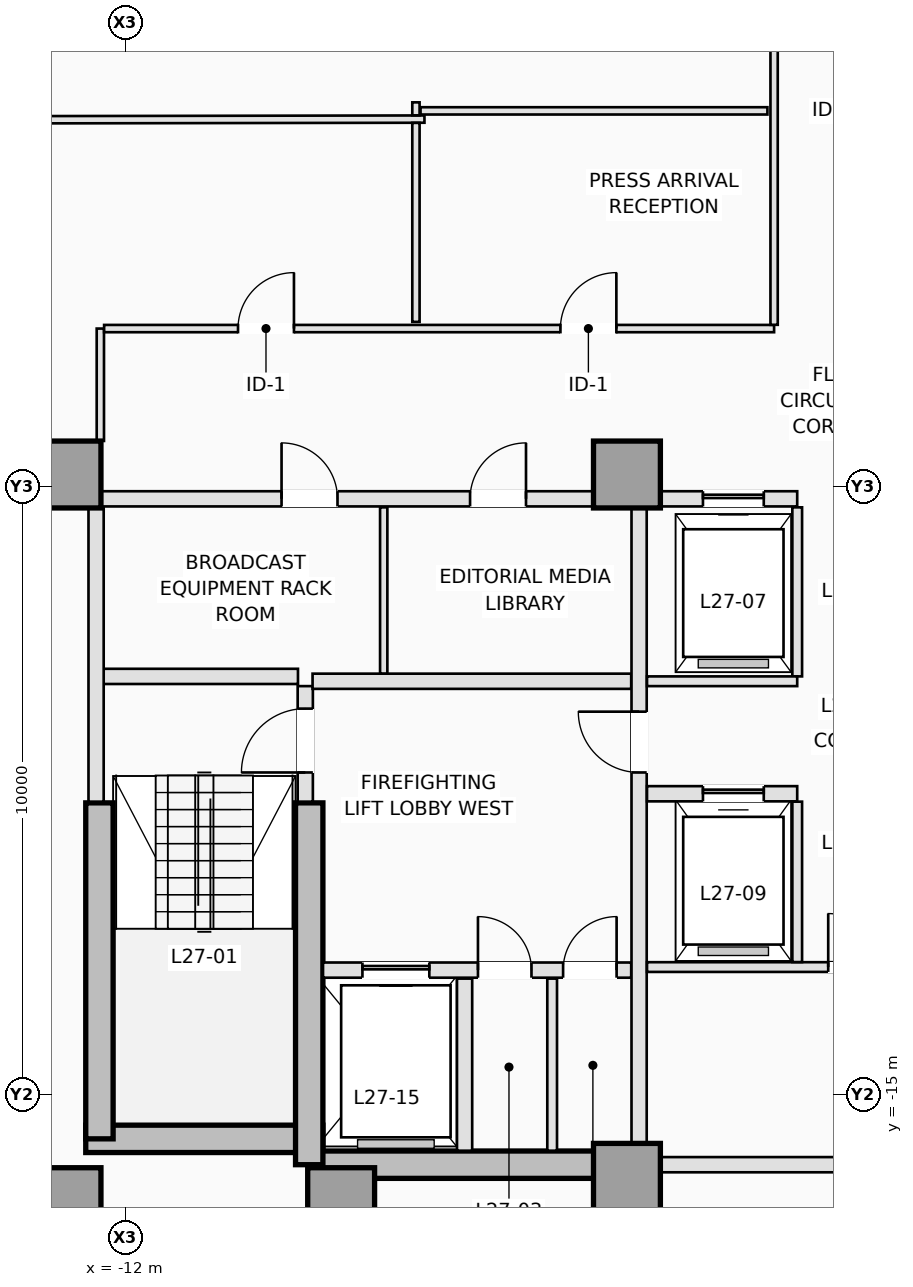
"""IFC4 building model, lengths in metres.
Left out: names, types, materials, properties, quantities, classifications, styles, units other than length and angle.
Written with IfcOpenShell. Run it as: python <this file> out.ifc"""

import sys

from ifc_helpers import new_model, si_unit, direction, frame, frame_2d, origin, origin_2d, place, context, subcontext, project, spatial, rectangle, extrude, element, fill, save


model = new_model("IFC4")
c1 = context("Model", 3, precision=1e-05, world=origin(), true_north=direction((0.0, 1.0)))
c2 = subcontext(c1, "Body", "Model", "MODEL_VIEW")
j1 = project(units=[si_unit("LENGTHUNIT", "METRE"), si_unit("PLANEANGLEUNIT", "RADIAN")], contexts=[c1])
p1 = place(None, origin())
s1 = spatial("IfcSite", under=j1, at=p1, CompositionType="ELEMENT")
p2 = place(p1, origin())
s2 = spatial("IfcBuilding", under=s1, at=p2, CompositionType="ELEMENT")
p3 = place(p2, frame((0.0, 0.0, 102.0)))
s3 = spatial("IfcBuildingStorey", under=s2, at=p3, CompositionType="ELEMENT", Elevation=102.0)
p4 = place(p3, frame((-12.65, -15.725, 0.0), z_axis=(0.0, 0.0, 1.0), x_axis=(1.0, 0.0, 0.0)))
e1 = element("IfcWall", 1, at=p4, inside=s3, PredefinedType="SHEAR", context=c2, shape_type="SweptSolid", body=[
    extrude(rectangle(XDim=3.9, YDim=0.45, at=frame_2d((1.95, 0.0))), origin(), (0.0, 0.0, 1.0), 3.5),
])
p5 = place(p3, frame((-8.975, -16.15, 0.0), z_axis=(0.0, 0.0, 1.0), x_axis=(1.0, 0.0, 0.0)))
e2 = element("IfcWall", 2, at=p5, inside=s3, PredefinedType="SHEAR", context=c2, shape_type="SweptSolid", body=[
    extrude(rectangle(XDim=5.225, YDim=0.45, at=frame_2d((2.613, 0.0))), origin(), (0.0, 0.0, 1.0), 3.5),
])
p6 = place(p3, frame((-12.425, -15.725, 0.0), z_axis=(0.0, 0.0, 1.0), x_axis=(0.0, 1.0, 0.0)))
e3 = element("IfcWall", 3, at=p6, inside=s3, PredefinedType="SHEAR", context=c2, shape_type="SweptSolid", body=[
    extrude(rectangle(XDim=5.525, YDim=0.45, at=frame_2d((2.763, 0.0))), origin(), (0.0, 0.0, 1.0), 3.5),
])
p7 = place(p3, frame((-8.975, -16.15, 0.0), z_axis=(0.0, 0.0, 1.0), x_axis=(0.0, 1.0, 0.0)))
e4 = element("IfcWall", 4, at=p7, inside=s3, PredefinedType="SHEAR", context=c2, shape_type="SweptSolid", body=[
    extrude(rectangle(XDim=5.95, YDim=0.45, at=frame_2d((2.975, 0.0))), origin(), (0.0, 0.0, 1.0), 3.5),
])
for number, where, z_axis, x_axis in (
    (5, (-12.95, -16.75, 0.0), (0.0, 0.0, 1.0), (1.0, 0.0, 0.0)),
    (6, (-8.45, -16.75, 0.0), (0.0, 0.0, 1.0), (1.0, 0.0, 0.0)),
    (7, (-3.75, -16.35, 0.0), (0.0, 0.0, 1.0), (1.0, 0.0, 0.0)),
    (8, (-12.95, -4.8, 0.0), (0.0, 0.0, 1.0), (1.0, 0.0, 0.0)),
    (9, (-3.75, -4.8, 0.0), (0.0, 0.0, 1.0), (1.0, 0.0, 0.0)),
):
    element("IfcColumn", number, at=place(p3, frame(where, z_axis=z_axis, x_axis=x_axis)), inside=s3, PredefinedType="COLUMN", context=c2, shape_type="SweptSolid", body=[
        extrude(rectangle(XDim=1.1, YDim=1.1, at=origin_2d()), origin(), (0.0, 0.0, 1.0), 3.5),
    ])
p8 = place(p3, frame((-9.04, -10.18, 0.0), z_axis=(0.0, 0.0, 1.0), x_axis=(0.0, 1.0, 0.0)))
e10 = element("IfcWall", 10, at=p8, inside=s3, PredefinedType="PARTITIONING", context=c2, shape_type="SweptSolid", body=[
    extrude(rectangle(XDim=1.9, YDim=0.25, at=frame_2d((0.95, 0.0))), origin(), (0.0, 0.0, 1.0), 3.25),
])
p9 = place(p8, frame((0.48, 0.0, 0.0)))
e11 = element("IfcOpeningElement", 11, at=p9, cuts=e10, PredefinedType="OPENING", context=c2, shape_type="SweptSolid", body=[
    extrude(rectangle(XDim=1.05, YDim=2.15, at=frame_2d((0.525, 1.075))), frame((0.0, 0.135, 0.0), z_axis=(0.0, -1.0, 0.0), x_axis=(1.0, 0.0, 0.0)), (0.0, 0.0, 1.0), 0.27),
])
p10 = place(p3, frame((-12.38, -8.12, 0.0), z_axis=(0.0, 0.0, 1.0), x_axis=(1.0, 0.0, 0.0)))
e12 = element("IfcWall", 12, at=p10, inside=s3, PredefinedType="PARTITIONING", context=c2, shape_type="SweptSolid", body=[
    extrude(rectangle(XDim=3.22, YDim=0.25, at=frame_2d((1.61, 0.0))), origin(), (0.0, 0.0, 1.0), 3.25),
])
p11 = place(p3, frame((-12.48, -10.18, 0.0), z_axis=(0.0, 0.0, 1.0), x_axis=(0.0, 1.0, 0.0)))
e13 = element("IfcWall", 13, at=p11, inside=s3, PredefinedType="PARTITIONING", context=c2, shape_type="SweptSolid", body=[
    extrude(rectangle(XDim=4.828, YDim=0.25, at=frame_2d((2.414, 0.0))), origin(), (0.0, 0.0, 1.0), 3.25),
])
p12 = place(p3, frame((-8.748, -12.95, 0.0), z_axis=(0.0, 0.0, 1.0), x_axis=(1.0, 0.0, 0.0)))
e14 = element("IfcWall", 14, at=p12, inside=s3, PredefinedType="PARTITIONING", context=c2, shape_type="SweptSolid", body=[
    extrude(rectangle(XDim=5.068, YDim=0.25, at=frame_2d((2.534, 0.0))), origin(), (0.0, 0.0, 1.0), 3.25),
])
p13 = place(p12, frame((0.648, 0.0, 0.0)))
e15 = element("IfcOpeningElement", 15, at=p13, cuts=e14, PredefinedType="OPENING", context=c2, shape_type="SweptSolid", body=[
    extrude(rectangle(XDim=1.1, YDim=2.15, at=frame_2d((0.55, 1.075))), frame((0.0, 0.135, 0.0), z_axis=(0.0, -1.0, 0.0), x_axis=(1.0, 0.0, 0.0)), (0.0, 0.0, 1.0), 0.27),
])
p14 = place(p12, frame((2.548, 0.0, 0.0)))
e16 = element("IfcOpeningElement", 16, at=p14, cuts=e14, PredefinedType="OPENING", context=c2, shape_type="SweptSolid", body=[
    extrude(rectangle(XDim=0.88, YDim=2.1, at=frame_2d((0.44, 1.05))), frame((0.0, 0.135, 0.0), z_axis=(0.0, -1.0, 0.0), x_axis=(1.0, 0.0, 0.0)), (0.0, 0.0, 1.0), 0.27),
])
p15 = place(p12, frame((3.948, 0.0, 0.0)))
e17 = element("IfcOpeningElement", 17, at=p15, cuts=e14, PredefinedType="OPENING", context=c2, shape_type="SweptSolid", body=[
    extrude(rectangle(XDim=0.88, YDim=2.1, at=frame_2d((0.44, 1.05))), frame((0.0, 0.135, 0.0), z_axis=(0.0, -1.0, 0.0), x_axis=(1.0, 0.0, 0.0)), (0.0, 0.0, 1.0), 0.27),
])
p16 = place(p3, frame((-6.42, -15.92, 0.0), z_axis=(0.0, 0.0, 1.0), x_axis=(0.0, 1.0, 0.0)))
e18 = element("IfcWall", 18, at=p16, inside=s3, PredefinedType="PARTITIONING", context=c2, shape_type="SweptSolid", body=[
    extrude(rectangle(XDim=2.83, YDim=0.25, at=frame_2d((1.415, 0.0))), origin(), (0.0, 0.0, 1.0), 3.25),
])
p17 = place(p3, frame((-4.98, -15.92, 0.0), z_axis=(0.0, 0.0, 1.0), x_axis=(0.0, 1.0, 0.0)))
e19 = element("IfcWall", 19, at=p17, inside=s3, PredefinedType="PARTITIONING", context=c2, shape_type="SweptSolid", body=[
    extrude(rectangle(XDim=2.83, YDim=0.16, at=frame_2d((1.415, 0.0))), origin(), (0.0, 0.0, 1.0), 3.25),
])
p18 = place(p3, frame((-8.92, -8.2, 0.0), z_axis=(0.0, 0.0, 1.0), x_axis=(1.0, 0.0, 0.0)))
e20 = element("IfcWall", 20, at=p18, inside=s3, PredefinedType="PARTITIONING", context=c2, shape_type="SweptSolid", body=[
    extrude(rectangle(XDim=5.24, YDim=0.25, at=frame_2d((2.62, 0.0))), origin(), (0.0, 0.0, 1.0), 3.25),
])
p19 = place(p3, frame((-3.55, -15.798, 0.0), z_axis=(0.0, 0.0, 1.0), x_axis=(0.0, 1.0, 0.0)))
e21 = element("IfcWall", 21, at=p19, inside=s3, PredefinedType="PARTITIONING", context=c2, shape_type="SweptSolid", body=[
    extrude(rectangle(XDim=10.446, YDim=0.25, at=frame_2d((5.223, 0.0))), origin(), (0.0, 0.0, 1.0), 3.25),
])
p20 = place(p19, frame((6.098, 0.0, 0.0)))
e22 = element("IfcOpeningElement", 22, at=p20, cuts=e21, PredefinedType="OPENING", context=c2, shape_type="SweptSolid", body=[
    extrude(rectangle(XDim=1.0, YDim=2.15, at=frame_2d((0.5, 1.075))), frame((0.0, 0.135, 0.0), z_axis=(0.0, -1.0, 0.0), x_axis=(1.0, 0.0, 0.0)), (0.0, 0.0, 1.0), 0.27),
])
p21 = place(p3, frame((-12.398, -5.2, 0.0), z_axis=(0.0, 0.0, 1.0), x_axis=(1.0, 0.0, 0.0)))
e23 = element("IfcWall", 23, at=p21, inside=s3, PredefinedType="PARTITIONING", context=c2, shape_type="SweptSolid", body=[
    extrude(rectangle(XDim=8.096, YDim=0.25, at=frame_2d((4.048, 0.0))), origin(), (0.0, 0.0, 1.0), 3.25),
])
p22 = place(p21, frame((2.968, 0.0, 0.0)))
e24 = element("IfcOpeningElement", 24, at=p22, cuts=e23, PredefinedType="OPENING", context=c2, shape_type="SweptSolid", body=[
    extrude(rectangle(XDim=0.92, YDim=2.12, at=frame_2d((0.46, 1.06))), frame((0.0, 0.135, 0.0), z_axis=(0.0, -1.0, 0.0), x_axis=(1.0, 0.0, 0.0)), (0.0, 0.0, 1.0), 0.27),
])
p23 = place(p21, frame((6.068, 0.0, 0.0)))
e25 = element("IfcOpeningElement", 25, at=p23, cuts=e23, PredefinedType="OPENING", context=c2, shape_type="SweptSolid", body=[
    extrude(rectangle(XDim=0.92, YDim=2.12, at=frame_2d((0.46, 1.06))), frame((0.0, 0.135, 0.0), z_axis=(0.0, -1.0, 0.0), x_axis=(1.0, 0.0, 0.0)), (0.0, 0.0, 1.0), 0.27),
])
p24 = place(p3, frame((-3.198, -5.2, 0.0), z_axis=(0.0, 0.0, 1.0), x_axis=(1.0, 0.0, 0.0)))
e26 = element("IfcWall", 26, at=p24, inside=s3, PredefinedType="PARTITIONING", context=c2, shape_type="SweptSolid", body=[
    extrude(rectangle(XDim=2.248, YDim=0.25, at=frame_2d((1.124, 0.0))), origin(), (0.0, 0.0, 1.0), 3.25),
])
p25 = place(p24, frame((0.698, 0.0, 0.0)))
e27 = element("IfcOpeningElement", 27, at=p25, cuts=e26, PredefinedType="OPENING", context=c2, shape_type="SweptSolid", body=[
    extrude(rectangle(XDim=1.0, YDim=2.15, at=frame_2d((0.5, 1.075))), frame((0.0, 0.135, 0.0), z_axis=(0.0, -1.0, 0.0), x_axis=(1.0, 0.0, 0.0)), (0.0, 0.0, 1.0), 0.27),
])
p26 = place(p3, frame((-7.75, -8.073, 0.0), z_axis=(0.0, 0.0, 1.0), x_axis=(0.0, 1.0, 0.0)))
e28 = element("IfcWall", 28, at=p26, inside=s3, PredefinedType="PARTITIONING", context=c2, shape_type="SweptSolid", body=[
    extrude(rectangle(XDim=2.733, YDim=0.12, at=frame_2d((1.366, 0.0))), origin(), (0.0, 0.0, 1.0), 3.25),
])
p27 = place(p3, frame((-3.198, -16.15, 0.0), z_axis=(0.0, 0.0, 1.0), x_axis=(1.0, 0.0, 0.0)))
e29 = element("IfcWall", 29, at=p27, inside=s3, PredefinedType="PARTITIONING", context=c2, shape_type="SweptSolid", body=[
    extrude(rectangle(XDim=6.396, YDim=0.25, at=frame_2d((3.198, 0.0))), origin(), (0.0, 0.0, 1.0), 2.3),
])
p28 = place(p3, frame((-0.95, -8.12, 0.0), z_axis=(0.0, 0.0, 1.0), x_axis=(0.0, 1.0, 0.0)))
e30 = element("IfcWall", 30, at=p28, inside=s3, PredefinedType="PARTITIONING", context=c2, shape_type="SweptSolid", body=[
    extrude(rectangle(XDim=2.78, YDim=0.16, at=frame_2d((1.39, 0.0))), origin(), (0.0, 0.0, 1.0), 3.25),
])
p29 = place(p3, frame((-3.42, -8.2, 0.0), z_axis=(0.0, 0.0, 1.0), x_axis=(1.0, 0.0, 0.0)))
e31 = element("IfcWall", 31, at=p29, inside=s3, PredefinedType="PARTITIONING", context=c2, shape_type="SweptSolid", body=[
    extrude(rectangle(XDim=2.47, YDim=0.16, at=frame_2d((1.235, 0.0))), origin(), (0.0, 0.0, 1.0), 3.25),
])
p30 = place(p3, frame((-3.42, -10.05, 0.0), z_axis=(0.0, 0.0, 1.0), x_axis=(1.0, 0.0, 0.0)))
e32 = element("IfcWall", 32, at=p30, inside=s3, PredefinedType="PARTITIONING", context=c2, shape_type="SweptSolid", body=[
    extrude(rectangle(XDim=2.47, YDim=0.25, at=frame_2d((1.235, 0.0))), origin(), (0.0, 0.0, 1.0), 3.25),
])
p31 = place(p30, frame((0.92, 0.0, 0.0)))
e33 = element("IfcOpeningElement", 33, at=p31, cuts=e32, PredefinedType="OPENING", context=c2, shape_type="SweptSolid", body=[
    extrude(rectangle(XDim=1.0, YDim=2.15, at=frame_2d((0.5, 1.075))), frame((0.0, 0.135, 0.0), z_axis=(0.0, -1.0, 0.0), x_axis=(1.0, 0.0, 0.0)), (0.0, 0.0, 1.0), 0.27),
])
p32 = place(p3, frame((-3.42, -12.9, 0.0), z_axis=(0.0, 0.0, 1.0), x_axis=(1.0, 0.0, 0.0)))
e34 = element("IfcWall", 34, at=p32, inside=s3, PredefinedType="PARTITIONING", context=c2, shape_type="SweptSolid", body=[
    extrude(rectangle(XDim=6.84, YDim=0.16, at=frame_2d((3.42, 0.0))), origin(), (0.0, 0.0, 1.0), 3.25),
])
p33 = place(p32, frame((2.98, 0.0, 0.0)))
e35 = element("IfcOpeningElement", 35, at=p33, cuts=e34, PredefinedType="OPENING", context=c2, shape_type="SweptSolid", body=[
    extrude(rectangle(XDim=0.88, YDim=2.12, at=frame_2d((0.44, 1.06))), frame((0.0, 0.09, 0.0), z_axis=(0.0, -1.0, 0.0), x_axis=(1.0, 0.0, 0.0)), (0.0, 0.0, 1.0), 0.18),
])
p34 = place(p3, frame((-0.95, -12.818, 0.0), z_axis=(0.0, 0.0, 1.0), x_axis=(0.0, 1.0, 0.0)))
e36 = element("IfcWall", 36, at=p34, inside=s3, PredefinedType="PARTITIONING", context=c2, shape_type="SweptSolid", body=[
    extrude(rectangle(XDim=2.638, YDim=0.16, at=frame_2d((1.319, 0.0))), origin(), (0.0, 0.0, 1.0), 3.25),
])
p35 = place(p3, frame((-12.41, -4.248, 0.0), z_axis=(0.0, 0.0, 1.0), x_axis=(0.0, 1.0, 0.0)))
e37 = element("IfcWall", 37, at=p35, inside=s3, PredefinedType="PARTITIONING", context=c2, shape_type="SweptSolid", body=[
    extrude(rectangle(XDim=1.848, YDim=0.12, at=frame_2d((0.924, 0.0))), origin(), (0.0, 0.0, 1.0), 3.25),
])
p36 = place(p3, frame((-12.348, -2.4, 0.0), z_axis=(0.0, 0.0, 1.0), x_axis=(1.0, 0.0, 0.0)))
e38 = element("IfcWall", 38, at=p36, inside=s3, PredefinedType="PARTITIONING", context=c2, shape_type="SweptSolid", body=[
    extrude(rectangle(XDim=11.018, YDim=0.12, at=frame_2d((5.509, 0.0))), origin(), (0.0, 0.0, 1.0), 3.25),
])
p37 = place(p36, frame((7.504, 0.0, 0.0)))
e39 = element("IfcOpeningElement", 39, at=p37, cuts=e38, PredefinedType="OPENING", context=c2, shape_type="SweptSolid", body=[
    extrude(rectangle(XDim=0.92, YDim=2.12, at=frame_2d((0.46, 1.06))), frame((0.0, 0.07, 0.0), z_axis=(0.0, -1.0, 0.0), x_axis=(1.0, 0.0, 0.0)), (0.0, 0.0, 1.0), 0.14),
])
p38 = place(p36, frame((2.202, 0.0, 0.0)))
e40 = element("IfcOpeningElement", 40, at=p38, cuts=e38, PredefinedType="OPENING", context=c2, shape_type="SweptSolid", body=[
    extrude(rectangle(XDim=0.92, YDim=2.12, at=frame_2d((0.46, 1.06))), frame((0.0, 0.07, 0.0), z_axis=(0.0, -1.0, 0.0), x_axis=(1.0, 0.0, 0.0)), (0.0, 0.0, 1.0), 0.14),
])
p39 = place(p3, frame((-1.33, -2.338, 0.0), z_axis=(0.0, 0.0, 1.0), x_axis=(0.0, 1.0, 0.0)))
e41 = element("IfcWall", 41, at=p39, inside=s3, PredefinedType="PARTITIONING", context=c2, shape_type="SweptSolid", body=[
    extrude(rectangle(XDim=13.888, YDim=0.12, at=frame_2d((6.944, 0.0))), origin(), (0.0, 0.0, 1.0), 3.25),
])
p40 = place(p39, frame((10.972, 0.0, 0.0)))
e42 = element("IfcOpeningElement", 42, at=p40, cuts=e41, PredefinedType="OPENING", context=c2, shape_type="SweptSolid", body=[
    extrude(rectangle(XDim=0.92, YDim=2.12, at=frame_2d((0.46, 1.06))), frame((0.0, 0.07, 0.0), z_axis=(0.0, -1.0, 0.0), x_axis=(1.0, 0.0, 0.0)), (0.0, 0.0, 1.0), 0.14),
])
p41 = place(p39, frame((5.653, 0.0, 0.0)))
e43 = element("IfcOpeningElement", 43, at=p41, cuts=e41, PredefinedType="OPENING", context=c2, shape_type="SweptSolid", body=[
    extrude(rectangle(XDim=0.92, YDim=2.12, at=frame_2d((0.46, 1.06))), frame((0.0, 0.07, 0.0), z_axis=(0.0, -1.0, 0.0), x_axis=(1.0, 0.0, 0.0)), (0.0, 0.0, 1.0), 0.14),
])
p42 = place(p3, frame((-1.44, 1.18, 0.0), z_axis=(0.0, 0.0, 1.0), x_axis=(-1.0, 0.0, 0.0)))
e44 = element("IfcWall", 44, at=p42, inside=s3, PredefinedType="PARTITIONING", context=c2, shape_type="SweptSolid", body=[
    extrude(rectangle(XDim=5.705, YDim=0.12, at=frame_2d((2.852, 0.0))), origin(), (0.0, 0.0, 1.0), 3.25),
])
p43 = place(p3, frame((-7.08, 1.045, 0.0), z_axis=(0.0, 0.0, 1.0), x_axis=(-0.999998659895, -0.001637134401, 0.0)))
e45 = element("IfcWall", 45, at=p43, inside=s3, PredefinedType="PARTITIONING", context=c2, shape_type="SweptSolid", body=[
    extrude(rectangle(XDim=9.246, YDim=0.12, at=frame_2d((4.623, 0.0))), origin(), (0.0, 0.0, 1.0), 3.25),
])
p44 = place(p3, frame((-7.22, -2.29, 0.0), z_axis=(0.0, 0.0, 1.0), x_axis=(0.0, 1.0, 0.0)))
e46 = element("IfcWall", 46, at=p44, inside=s3, PredefinedType="PARTITIONING", context=c2, shape_type="SweptSolid", body=[
    extrude(rectangle(XDim=3.272, YDim=0.12, at=frame_2d((1.636, 0.0))), origin(), (0.0, 0.0, 1.0), 3.25),
])
p45 = place(p3, frame((-7.22, 1.106, 0.0), z_axis=(0.0, 0.0, 1.0), x_axis=(0.0, 1.0, 0.0)))
e47 = element("IfcWall", 47, at=p45, inside=s3, PredefinedType="PARTITIONING", context=c2, shape_type="SweptSolid", body=[
    extrude(rectangle(XDim=0.214, YDim=0.12, at=frame_2d((0.107, 0.0))), origin(), (0.0, 0.0, 1.0), 3.25),
])
p46 = place(p25, origin())
e48 = element("IfcDoor", 48, at=p46, inside=s3, OperationType="SLIDING_TO_LEFT", PredefinedType="DOOR", context=c2, shape_type="SweptSolid", body=[
    extrude(rectangle(XDim=1.0, YDim=2.15, at=frame_2d((0.5, 1.075))), frame((0.0, 0.025, 0.0), z_axis=(0.0, -1.0, 0.0), x_axis=(1.0, 0.0, 0.0)), (0.0, 0.0, 1.0), 0.05),
])
fill(e27, e48)
p47 = place(p13, origin())
e49 = element("IfcDoor", 49, at=p47, inside=s3, OperationType="SLIDING_TO_LEFT", PredefinedType="DOOR", context=c2, shape_type="SweptSolid", body=[
    extrude(rectangle(XDim=1.1, YDim=2.15, at=frame_2d((0.55, 1.075))), frame((0.0, 0.025, 0.0), z_axis=(0.0, -1.0, 0.0), x_axis=(1.0, 0.0, 0.0)), (0.0, 0.0, 1.0), 0.05),
])
fill(e15, e49)
p48 = place(p31, origin())
e50 = element("IfcDoor", 50, at=p48, inside=s3, OperationType="SLIDING_TO_LEFT", PredefinedType="DOOR", context=c2, shape_type="SweptSolid", body=[
    extrude(rectangle(XDim=1.0, YDim=2.15, at=frame_2d((0.5, 1.075))), frame((0.0, 0.025, 0.0), z_axis=(0.0, -1.0, 0.0), x_axis=(1.0, 0.0, 0.0)), (0.0, 0.0, 1.0), 0.05),
])
fill(e33, e50)
p49 = place(p9, origin())
e51 = element("IfcDoor", 51, at=p49, inside=s3, OperationType="SINGLE_SWING_LEFT", PredefinedType="DOOR", context=c2, shape_type="SweptSolid", body=[
    extrude(rectangle(XDim=1.05, YDim=2.15, at=frame_2d((0.525, 1.075))), frame((0.0, 0.025, 0.0), z_axis=(0.0, -1.0, 0.0), x_axis=(1.0, 0.0, 0.0)), (0.0, 0.0, 1.0), 0.05),
])
fill(e11, e51)
p50 = place(p14, origin())
e52 = element("IfcDoor", 52, at=p50, inside=s3, OperationType="SINGLE_SWING_LEFT", PredefinedType="TRAPDOOR", context=c2, shape_type="SweptSolid", body=[
    extrude(rectangle(XDim=0.88, YDim=2.1, at=frame_2d((0.44, 1.05))), frame((0.0, 0.025, 0.0), z_axis=(0.0, -1.0, 0.0), x_axis=(1.0, 0.0, 0.0)), (0.0, 0.0, 1.0), 0.05),
])
fill(e16, e52)
p51 = place(p15, origin())
e53 = element("IfcDoor", 53, at=p51, inside=s3, OperationType="SINGLE_SWING_RIGHT", PredefinedType="TRAPDOOR", context=c2, shape_type="SweptSolid", body=[
    extrude(rectangle(XDim=0.88, YDim=2.1, at=frame_2d((0.44, 1.05))), frame((0.0, 0.025, 0.0), z_axis=(0.0, -1.0, 0.0), x_axis=(1.0, 0.0, 0.0)), (0.0, 0.0, 1.0), 0.05),
])
fill(e17, e53)
p52 = place(p20, origin())
e54 = element("IfcDoor", 54, at=p52, inside=s3, OperationType="SINGLE_SWING_RIGHT", PredefinedType="DOOR", context=c2, shape_type="SweptSolid", body=[
    extrude(rectangle(XDim=1.0, YDim=2.15, at=frame_2d((0.5, 1.075))), frame((0.0, 0.025, 0.0), z_axis=(0.0, -1.0, 0.0), x_axis=(1.0, 0.0, 0.0)), (0.0, 0.0, 1.0), 0.05),
])
fill(e22, e54)
p53 = place(p22, origin())
e55 = element("IfcDoor", 55, at=p53, inside=s3, OperationType="SINGLE_SWING_LEFT", PredefinedType="DOOR", context=c2, shape_type="SweptSolid", body=[
    extrude(rectangle(XDim=0.92, YDim=2.12, at=frame_2d((0.46, 1.06))), frame((0.0, 0.025, 0.0), z_axis=(0.0, -1.0, 0.0), x_axis=(1.0, 0.0, 0.0)), (0.0, 0.0, 1.0), 0.05),
])
fill(e24, e55)
p54 = place(p23, origin())
e56 = element("IfcDoor", 56, at=p54, inside=s3, OperationType="SINGLE_SWING_RIGHT", PredefinedType="DOOR", context=c2, shape_type="SweptSolid", body=[
    extrude(rectangle(XDim=0.92, YDim=2.12, at=frame_2d((0.46, 1.06))), frame((0.0, 0.025, 0.0), z_axis=(0.0, -1.0, 0.0), x_axis=(1.0, 0.0, 0.0)), (0.0, 0.0, 1.0), 0.05),
])
fill(e25, e56)
p55 = place(p33, origin())
e57 = element("IfcDoor", 57, at=p55, inside=s3, OperationType="SINGLE_SWING_LEFT", PredefinedType="DOOR", context=c2, shape_type="SweptSolid", body=[
    extrude(rectangle(XDim=0.88, YDim=2.12, at=frame_2d((0.44, 1.06))), frame((0.0, 0.025, 0.0), z_axis=(0.0, -1.0, 0.0), x_axis=(1.0, 0.0, 0.0)), (0.0, 0.0, 1.0), 0.05),
])
fill(e35, e57)
p56 = place(p37, origin())
e58 = element("IfcDoor", 58, at=p56, inside=s3, OperationType="SINGLE_SWING_RIGHT", PredefinedType="DOOR", context=c2, shape_type="SweptSolid", body=[
    extrude(rectangle(XDim=0.92, YDim=2.12, at=frame_2d((0.46, 1.06))), frame((0.0, 0.025, 0.0), z_axis=(0.0, -1.0, 0.0), x_axis=(1.0, 0.0, 0.0)), (0.0, 0.0, 1.0), 0.05),
])
fill(e39, e58)
p57 = place(p38, origin())
e59 = element("IfcDoor", 59, at=p57, inside=s3, OperationType="SINGLE_SWING_RIGHT", PredefinedType="DOOR", context=c2, shape_type="SweptSolid", body=[
    extrude(rectangle(XDim=0.92, YDim=2.12, at=frame_2d((0.46, 1.06))), frame((0.0, 0.025, 0.0), z_axis=(0.0, -1.0, 0.0), x_axis=(1.0, 0.0, 0.0)), (0.0, 0.0, 1.0), 0.05),
])
fill(e40, e59)
save(model, sys.argv[1])
